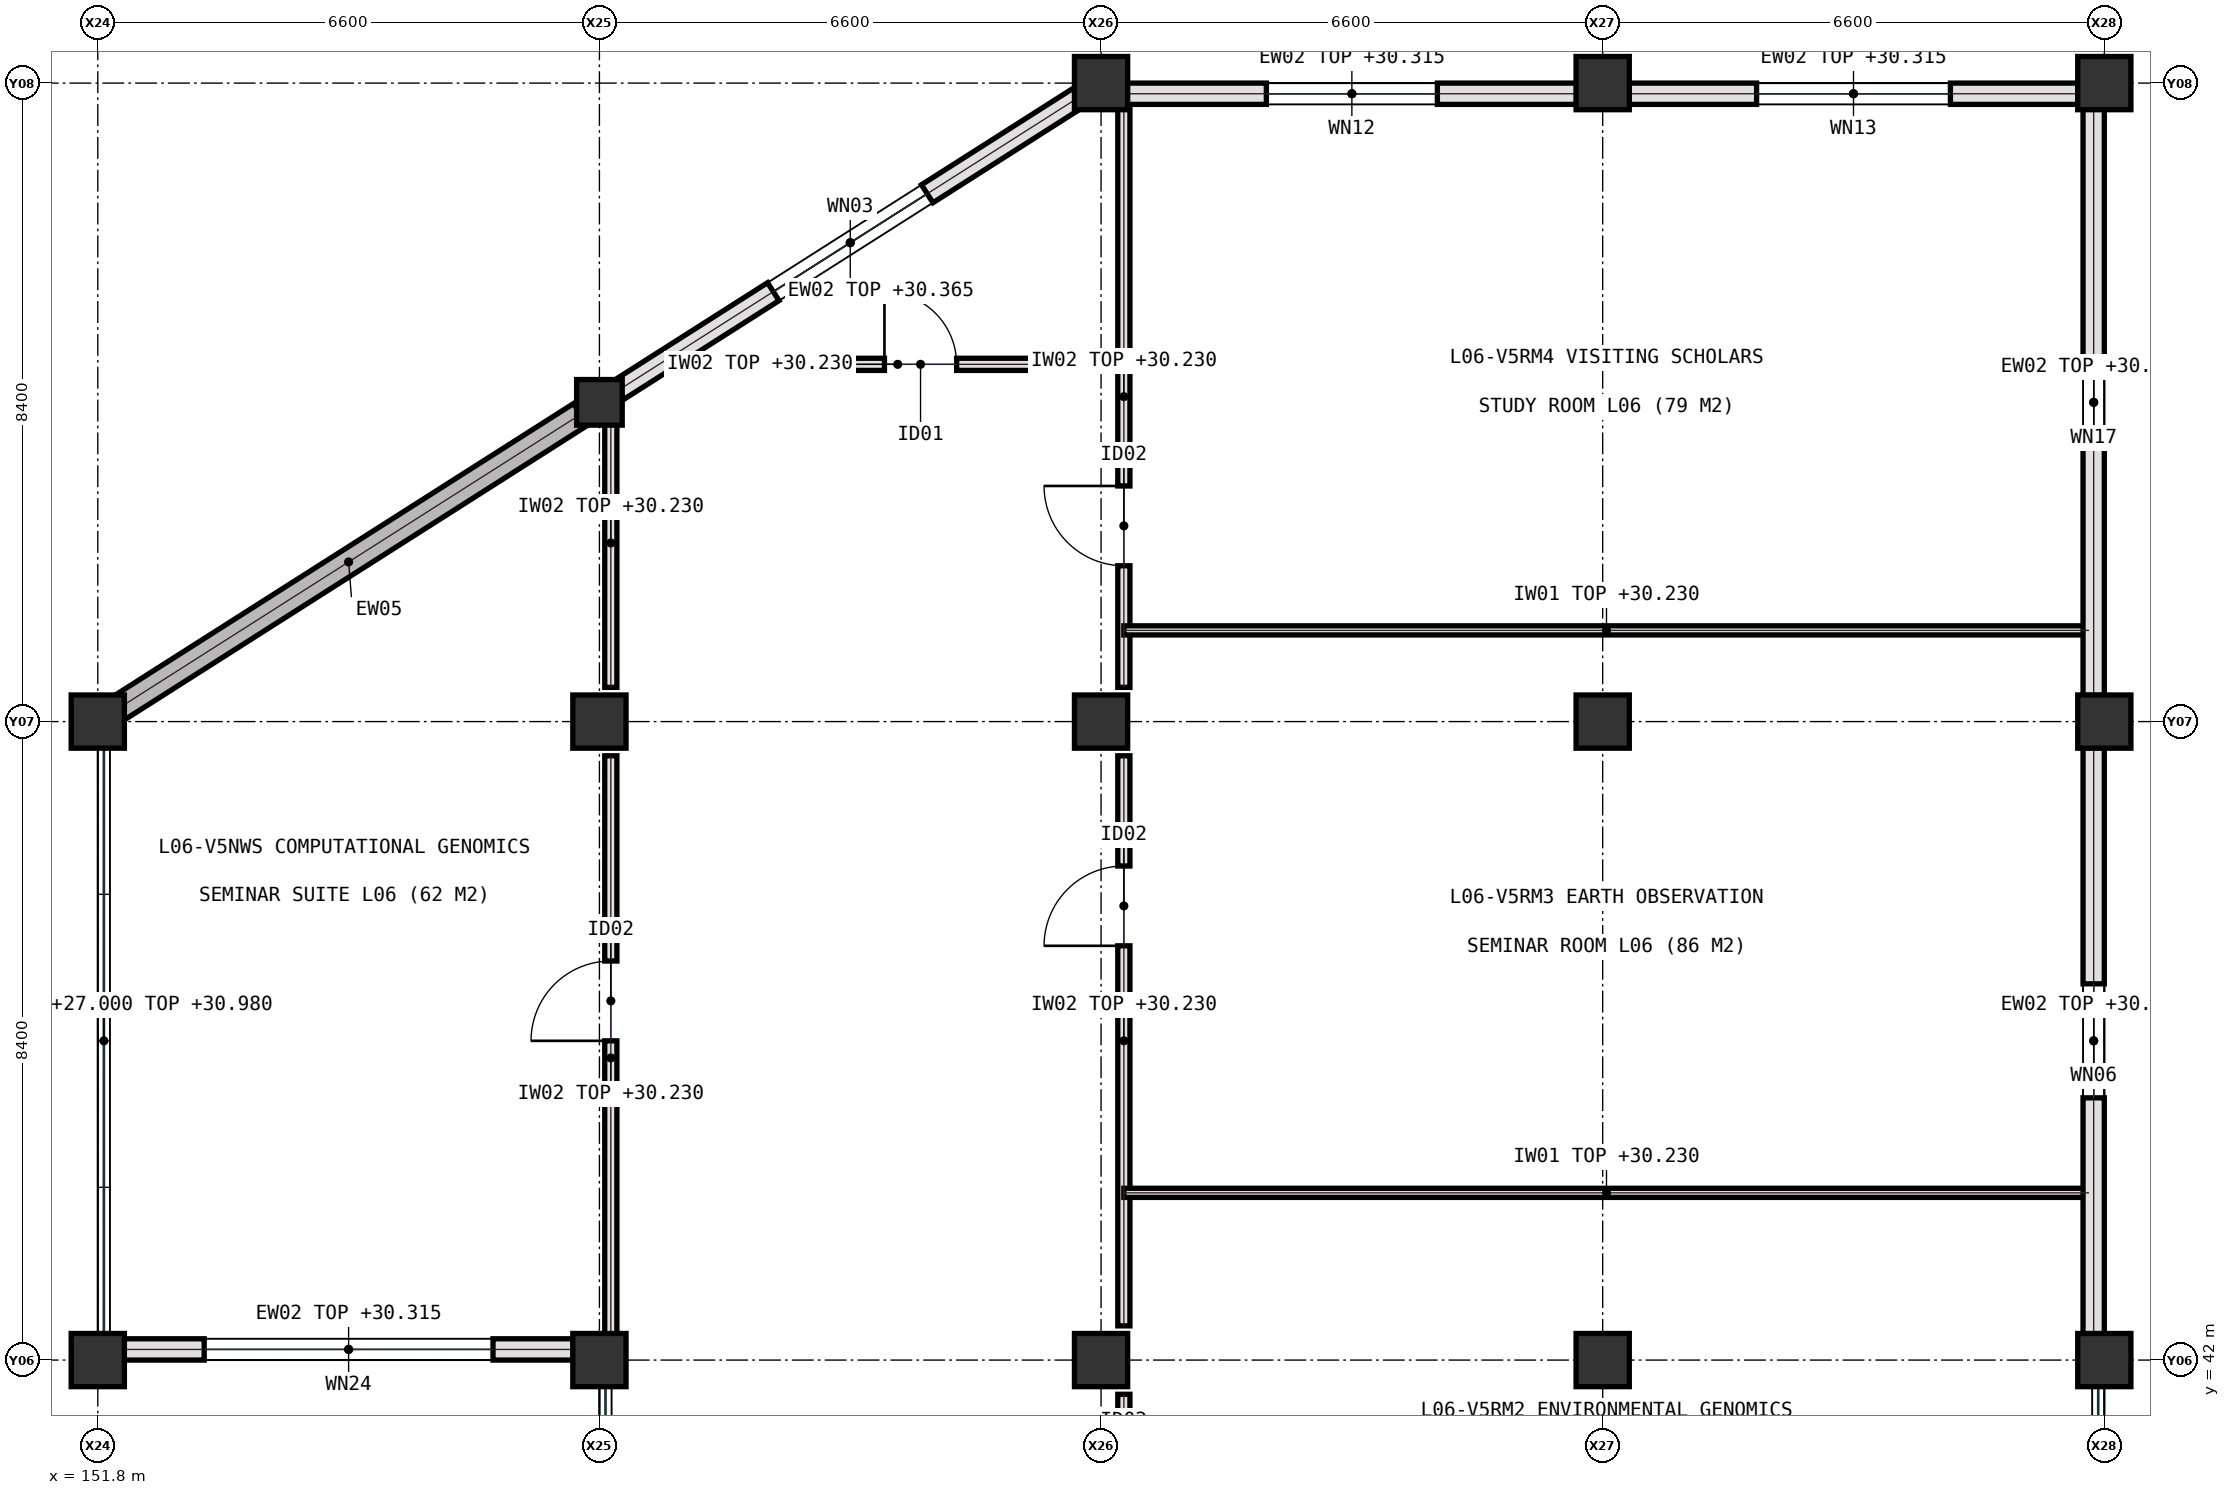
"""IFC4 building model, lengths in metres.
Left out: names, types, materials, properties, quantities, classifications, styles, units other than length and angle.
Written with IfcOpenShell. Run it as: python <this file> out.ifc"""

import sys

from ifc_helpers import new_model, si_unit, direction, frame, frame_2d, origin, origin_2d, place, context, subcontext, project, spatial, rectangle, extrude, element, fill, save


model = new_model("IFC4")
c1 = context("Model", 3, precision=1e-05, world=origin(), true_north=direction((0.0, 1.0)))
c2 = subcontext(c1, "Body", "Model", "MODEL_VIEW")
j1 = project(units=[si_unit("LENGTHUNIT", "METRE"), si_unit("PLANEANGLEUNIT", "RADIAN")], contexts=[c1])
p1 = place(None, origin())
s1 = spatial("IfcSite", under=j1, at=p1, CompositionType="ELEMENT")
p2 = place(p1, origin())
s2 = spatial("IfcBuilding", under=s1, at=p2, CompositionType="ELEMENT")
p3 = place(p2, frame((0.0, 0.0, 27.0)))
s3 = spatial("IfcBuildingStorey", under=s2, at=p3, CompositionType="ELEMENT", Elevation=27.0)
for number, where, z_axis, x_axis in (
    (1, (151.8, 42.0, 0.0), (0.0, 0.0, 1.0), (1.0, 0.0, 0.0)),
    (2, (151.8, 50.4, 0.0), (0.0, 0.0, 1.0), (1.0, 0.0, 0.0)),
    (3, (158.4, 42.0, 0.0), (0.0, 0.0, 1.0), (1.0, 0.0, 0.0)),
    (4, (158.4, 50.4, 0.0), (0.0, 0.0, 1.0), (1.0, 0.0, 0.0)),
    (5, (165.0, 42.0, 0.0), (0.0, 0.0, 1.0), (1.0, 0.0, 0.0)),
    (6, (165.0, 50.4, 0.0), (0.0, 0.0, 1.0), (1.0, 0.0, 0.0)),
    (7, (165.0, 58.8, 0.0), (0.0, 0.0, 1.0), (1.0, 0.0, 0.0)),
    (8, (171.6, 42.0, 0.0), (0.0, 0.0, 1.0), (1.0, 0.0, 0.0)),
    (9, (171.6, 50.4, 0.0), (0.0, 0.0, 1.0), (1.0, 0.0, 0.0)),
    (10, (171.6, 58.8, 0.0), (0.0, 0.0, 1.0), (1.0, 0.0, 0.0)),
    (11, (178.2, 42.0, 0.0), (0.0, 0.0, 1.0), (1.0, 0.0, 0.0)),
    (12, (178.2, 50.4, 0.0), (0.0, 0.0, 1.0), (1.0, 0.0, 0.0)),
    (13, (178.2, 58.8, 0.0), (0.0, 0.0, 1.0), (1.0, 0.0, 0.0)),
):
    element("IfcColumn", number, at=place(p3, frame(where, z_axis=z_axis, x_axis=x_axis)), inside=s3, PredefinedType="COLUMN", context=c2, shape_type="SweptSolid", body=[
        extrude(rectangle(XDim=0.7, YDim=0.7, at=origin_2d()), origin(), (0.0, 0.0, 1.0), 4.2),
    ])
p4 = place(p3, frame((158.4, 54.6, 0.0), z_axis=(0.0, 0.0, 1.0), x_axis=(1.0, 0.0, 0.0)))
e14 = element("IfcColumn", 14, at=p4, inside=s3, PredefinedType="COLUMN", context=c2, shape_type="SweptSolid", body=[
    extrude(rectangle(XDim=0.6, YDim=0.6, at=origin_2d()), origin(), (0.0, 0.0, 1.0), 3.98),
])
p5 = place(p3, frame((165.3, 33.65, 0.0), z_axis=(0.0, 0.0, 1.0), x_axis=(0.0, 1.0, 0.0)))
e15 = element("IfcWall", 15, at=p5, inside=s3, PredefinedType="PARTITIONING", context=c2, shape_type="SweptSolid", body=[
    extrude(rectangle(XDim=7.9, YDim=0.16, at=frame_2d((3.95, 0.0))), origin(), (0.0, 0.0, 1.0), 3.23),
])
p6 = place(p5, frame((1.9, 0.0, 0.0)))
e16 = element("IfcOpeningElement", 16, at=p6, cuts=e15, PredefinedType="OPENING", context=c2, shape_type="SweptSolid", body=[
    extrude(rectangle(XDim=1.05, YDim=2.15, at=frame_2d((0.525, 1.075))), frame((0.0, 0.09, 0.0), z_axis=(0.0, -1.0, 0.0), x_axis=(1.0, 0.0, 0.0)), (0.0, 0.0, 1.0), 0.18),
])
p7 = place(p5, frame((6.1, 0.0, 0.0)))
e17 = element("IfcOpeningElement", 17, at=p7, cuts=e15, PredefinedType="OPENING", context=c2, shape_type="SweptSolid", body=[
    extrude(rectangle(XDim=1.05, YDim=2.15, at=frame_2d((0.525, 1.075))), frame((0.0, 0.09, 0.0), z_axis=(0.0, -1.0, 0.0), x_axis=(1.0, 0.0, 0.0)), (0.0, 0.0, 1.0), 0.18),
])
p8 = place(p3, frame((165.3, 42.45, 0.0), z_axis=(0.0, 0.0, 1.0), x_axis=(0.0, 1.0, 0.0)))
e18 = element("IfcWall", 18, at=p8, inside=s3, PredefinedType="PARTITIONING", context=c2, shape_type="SweptSolid", body=[
    extrude(rectangle(XDim=7.5, YDim=0.16, at=frame_2d((3.75, 0.0))), origin(), (0.0, 0.0, 1.0), 3.23),
])
p9 = place(p8, frame((5.0, 0.0, 0.0)))
e19 = element("IfcOpeningElement", 19, at=p9, cuts=e18, PredefinedType="OPENING", context=c2, shape_type="SweptSolid", body=[
    extrude(rectangle(XDim=1.05, YDim=2.15, at=frame_2d((0.525, 1.075))), frame((0.0, 0.09, 0.0), z_axis=(0.0, -1.0, 0.0), x_axis=(1.0, 0.0, 0.0)), (0.0, 0.0, 1.0), 0.18),
])
p10 = place(p3, frame((165.3, 50.85, 0.0), z_axis=(0.0, 0.0, 1.0), x_axis=(0.0, 1.0, 0.0)))
e20 = element("IfcWall", 20, at=p10, inside=s3, PredefinedType="PARTITIONING", context=c2, shape_type="SweptSolid", body=[
    extrude(rectangle(XDim=7.65, YDim=0.16, at=frame_2d((3.825, 0.0))), origin(), (0.0, 0.0, 1.0), 3.23),
])
p11 = place(p10, frame((1.6, 0.0, 0.0)))
e21 = element("IfcOpeningElement", 21, at=p11, cuts=e20, PredefinedType="OPENING", context=c2, shape_type="SweptSolid", body=[
    extrude(rectangle(XDim=1.05, YDim=2.15, at=frame_2d((0.525, 1.075))), frame((0.0, 0.09, 0.0), z_axis=(0.0, -1.0, 0.0), x_axis=(1.0, 0.0, 0.0)), (0.0, 0.0, 1.0), 0.18),
])
for number, where, z_axis, x_axis in (
    (22, (165.3, 44.2, 0.0), (0.0, 0.0, 1.0), (1.0, 0.0, 0.0)),
    (23, (165.3, 51.6, 0.0), (0.0, 0.0, 1.0), (1.0, 0.0, 0.0)),
):
    element("IfcWall", number, at=place(p3, frame(where, z_axis=z_axis, x_axis=x_axis)), inside=s3, PredefinedType="PARTITIONING", context=c2, shape_type="SweptSolid", body=[
        extrude(rectangle(XDim=12.7, YDim=0.12, at=frame_2d((6.35, 0.0))), origin(), (0.0, 0.0, 1.0), 3.23),
    ])
p12 = place(p3, frame((158.55, 42.0, 0.0), z_axis=(0.0, 0.0, 1.0), x_axis=(0.0, 1.0, 0.0)))
e24 = element("IfcWall", 24, at=p12, inside=s3, PredefinedType="PARTITIONING", context=c2, shape_type="SweptSolid", body=[
    extrude(rectangle(XDim=7.95, YDim=0.16, at=frame_2d((3.975, 0.0))), origin(), (0.0, 0.0, 1.0), 3.23),
])
p13 = place(p12, frame((4.2, 0.0, 0.0)))
e25 = element("IfcOpeningElement", 25, at=p13, cuts=e24, PredefinedType="OPENING", context=c2, shape_type="SweptSolid", body=[
    extrude(rectangle(XDim=1.05, YDim=2.15, at=frame_2d((0.525, 1.075))), frame((0.0, 0.09, 0.0), z_axis=(0.0, -1.0, 0.0), x_axis=(1.0, 0.0, 0.0)), (0.0, 0.0, 1.0), 0.18),
])
p14 = place(p3, frame((158.55, 50.85, 0.0), z_axis=(0.0, 0.0, 1.0), x_axis=(0.0, 1.0, 0.0)))
e26 = element("IfcWall", 26, at=p14, inside=s3, PredefinedType="PARTITIONING", context=c2, shape_type="SweptSolid", body=[
    extrude(rectangle(XDim=3.8, YDim=0.16, at=frame_2d((1.9, 0.0))), origin(), (0.0, 0.0, 1.0), 3.23),
])
p15 = place(p3, frame((159.35, 55.1, 0.0), z_axis=(0.0, 0.0, 1.0), x_axis=(1.0, 0.0, 0.0)))
e27 = element("IfcWall", 27, at=p15, inside=s3, PredefinedType="PARTITIONING", context=c2, shape_type="SweptSolid", body=[
    extrude(rectangle(XDim=5.95, YDim=0.16, at=frame_2d((2.975, 0.0))), origin(), (0.0, 0.0, 1.0), 3.23),
])
p16 = place(p15, frame((2.8, 0.0, 0.0)))
e28 = element("IfcOpeningElement", 28, at=p16, cuts=e27, PredefinedType="OPENING", context=c2, shape_type="SweptSolid", body=[
    extrude(rectangle(XDim=0.95, YDim=2.15, at=frame_2d((0.475, 1.075))), frame((0.0, 0.09, 0.0), z_axis=(0.0, -1.0, 0.0), x_axis=(1.0, 0.0, 0.0)), (0.0, 0.0, 1.0), 0.18),
])
p17 = place(p3, frame((152.145, 42.14, 0.0), z_axis=(0.0, 0.0, 1.0), x_axis=(1.0, 0.0, 0.0)))
e29 = element("IfcWall", 29, at=p17, inside=s3, PredefinedType="SOLIDWALL", context=c2, shape_type="SweptSolid", body=[
    extrude(rectangle(XDim=5.91, YDim=0.28, at=frame_2d((2.955, 0.0))), origin(), (0.0, 0.0, 1.0), 3.315),
])
p18 = place(p17, frame((1.055, 0.0, 1.35)))
e30 = element("IfcOpeningElement", 30, at=p18, cuts=e29, PredefinedType="OPENING", context=c2, shape_type="SweptSolid", body=[
    extrude(rectangle(XDim=3.8, YDim=1.15, at=frame_2d((1.9, 0.575))), frame((0.0, 0.15, 0.0), z_axis=(0.0, -1.0, 0.0), x_axis=(1.0, 0.0, 0.0)), (0.0, 0.0, 1.0), 0.3),
])
p19 = place(p3, frame((171.255, 58.66, 0.0), z_axis=(0.0, 0.0, 1.0), x_axis=(-1.0, 0.0, 0.0)))
e31 = element("IfcWall", 31, at=p19, inside=s3, PredefinedType="SOLIDWALL", context=c2, shape_type="SweptSolid", body=[
    extrude(rectangle(XDim=5.91, YDim=0.28, at=frame_2d((2.955, 0.0))), origin(), (0.0, 0.0, 1.0), 3.315),
])
p20 = place(p19, frame((1.83, 0.0, 0.95)))
e32 = element("IfcOpeningElement", 32, at=p20, cuts=e31, PredefinedType="OPENING", context=c2, shape_type="SweptSolid", body=[
    extrude(rectangle(XDim=2.25, YDim=1.55, at=frame_2d((1.125, 0.775))), frame((0.0, 0.15, 0.0), z_axis=(0.0, -1.0, 0.0), x_axis=(1.0, 0.0, 0.0)), (0.0, 0.0, 1.0), 0.3),
])
p21 = place(p3, frame((178.06, 42.345, 0.0), z_axis=(0.0, 0.0, 1.0), x_axis=(0.0, 1.0, 0.0)))
e33 = element("IfcWall", 33, at=p21, inside=s3, PredefinedType="SOLIDWALL", context=c2, shape_type="SweptSolid", body=[
    extrude(rectangle(XDim=7.71, YDim=0.28, at=frame_2d((3.855, 0.0))), origin(), (0.0, 0.0, 1.0), 3.365),
])
p22 = place(p21, frame((3.105, 0.0, 0.95)))
e34 = element("IfcOpeningElement", 34, at=p22, cuts=e33, PredefinedType="OPENING", context=c2, shape_type="SweptSolid", body=[
    extrude(rectangle(XDim=1.5, YDim=2.1, at=frame_2d((0.75, 1.05))), frame((0.0, 0.15, 0.0), z_axis=(0.0, -1.0, 0.0), x_axis=(1.0, 0.0, 0.0)), (0.0, 0.0, 1.0), 0.3),
])
p23 = place(p3, frame((178.06, 50.745, 0.0), z_axis=(0.0, 0.0, 1.0), x_axis=(0.0, 1.0, 0.0)))
e35 = element("IfcWall", 35, at=p23, inside=s3, PredefinedType="SOLIDWALL", context=c2, shape_type="SweptSolid", body=[
    extrude(rectangle(XDim=7.71, YDim=0.28, at=frame_2d((3.855, 0.0))), origin(), (0.0, 0.0, 1.0), 3.365),
])
p24 = place(p23, frame((3.33, 0.0, 0.95)))
e36 = element("IfcOpeningElement", 36, at=p24, cuts=e35, PredefinedType="OPENING", context=c2, shape_type="SweptSolid", body=[
    extrude(rectangle(XDim=1.05, YDim=1.75, at=frame_2d((0.525, 0.875))), frame((0.0, 0.15, 0.0), z_axis=(0.0, -1.0, 0.0), x_axis=(1.0, 0.0, 0.0)), (0.0, 0.0, 1.0), 0.3),
])
p25 = place(p3, frame((177.855, 58.66, 0.0), z_axis=(0.0, 0.0, 1.0), x_axis=(-1.0, 0.0, 0.0)))
e37 = element("IfcWall", 37, at=p25, inside=s3, PredefinedType="SOLIDWALL", context=c2, shape_type="SweptSolid", body=[
    extrude(rectangle(XDim=5.91, YDim=0.28, at=frame_2d((2.955, 0.0))), origin(), (0.0, 0.0, 1.0), 3.315),
])
p26 = place(p25, frame((1.68, 0.0, 0.95)))
e38 = element("IfcOpeningElement", 38, at=p26, cuts=e37, PredefinedType="OPENING", context=c2, shape_type="SweptSolid", body=[
    extrude(rectangle(XDim=2.55, YDim=1.65, at=frame_2d((1.275, 0.825))), frame((0.0, 0.15, 0.0), z_axis=(0.0, -1.0, 0.0), x_axis=(1.0, 0.0, 0.0)), (0.0, 0.0, 1.0), 0.3),
])
p27 = place(p3, frame((152.05, 50.56, 0.0), z_axis=(0.0, 0.0, 1.0), x_axis=(0.843776886751, 0.536694107835, 0.0)))
e39 = element("IfcWall", 39, at=p27, inside=s3, PredefinedType="SHEAR", context=c2, shape_type="SweptSolid", body=[
    extrude(rectangle(XDim=7.229, YDim=0.34, at=frame_2d((3.615, 0.0))), origin(), (0.0, 0.0, 1.0), 3.98),
])
p28 = place(p3, frame((158.65, 54.76, 0.0), z_axis=(0.0, 0.0, 1.0), x_axis=(0.843786613851, 0.536678814829, 0.0)))
e40 = element("IfcWall", 40, at=p28, inside=s3, PredefinedType="SOLIDWALL", context=c2, shape_type="SweptSolid", body=[
    extrude(rectangle(XDim=7.229, YDim=0.28, at=frame_2d((3.615, 0.0))), origin(), (0.0, 0.0, 1.0), 3.365),
])
p29 = place(p28, frame((2.415, 0.0, 0.95)))
e41 = element("IfcOpeningElement", 41, at=p29, cuts=e40, PredefinedType="OPENING", context=c2, shape_type="SweptSolid", body=[
    extrude(rectangle(XDim=2.4, YDim=1.6, at=frame_2d((1.2, 0.8))), frame((0.0, 0.15, 0.0), z_axis=(0.0, -1.0, 0.0), x_axis=(1.0, 0.0, 0.0)), (0.0, 0.0, 1.0), 0.3),
])
p30 = place(p9, origin())
e42 = element("IfcDoor", 42, at=p30, inside=s3, OperationType="SINGLE_SWING_LEFT", PredefinedType="DOOR", context=c2, shape_type="SweptSolid", body=[
    extrude(rectangle(XDim=1.05, YDim=2.15, at=frame_2d((0.525, 1.075))), frame((0.0, 0.025, 0.0), z_axis=(0.0, -1.0, 0.0), x_axis=(1.0, 0.0, 0.0)), (0.0, 0.0, 1.0), 0.05),
])
fill(e19, e42)
p31 = place(p11, origin())
e43 = element("IfcDoor", 43, at=p31, inside=s3, OperationType="SINGLE_SWING_RIGHT", PredefinedType="DOOR", context=c2, shape_type="SweptSolid", body=[
    extrude(rectangle(XDim=1.05, YDim=2.15, at=frame_2d((0.525, 1.075))), frame((0.0, 0.025, 0.0), z_axis=(0.0, -1.0, 0.0), x_axis=(1.0, 0.0, 0.0)), (0.0, 0.0, 1.0), 0.05),
])
fill(e21, e43)
p32 = place(p13, origin())
e44 = element("IfcDoor", 44, at=p32, inside=s3, OperationType="SINGLE_SWING_LEFT", PredefinedType="DOOR", context=c2, shape_type="SweptSolid", body=[
    extrude(rectangle(XDim=1.05, YDim=2.15, at=frame_2d((0.525, 1.075))), frame((0.0, 0.025, 0.0), z_axis=(0.0, -1.0, 0.0), x_axis=(1.0, 0.0, 0.0)), (0.0, 0.0, 1.0), 0.05),
])
fill(e25, e44)
p33 = place(p16, origin())
e45 = element("IfcDoor", 45, at=p33, inside=s3, OperationType="SINGLE_SWING_LEFT", PredefinedType="DOOR", context=c2, shape_type="SweptSolid", body=[
    extrude(rectangle(XDim=0.95, YDim=2.15, at=frame_2d((0.475, 1.075))), frame((0.0, 0.025, 0.0), z_axis=(0.0, -1.0, 0.0), x_axis=(1.0, 0.0, 0.0)), (0.0, 0.0, 1.0), 0.05),
])
fill(e28, e45)
p34 = place(p18, origin())
e46 = element("IfcWindow", 46, at=p34, inside=s3, PartitioningType="SINGLE_PANEL", PredefinedType="WINDOW", context=c2, shape_type="SweptSolid", body=[
    extrude(rectangle(XDim=3.8, YDim=1.15, at=frame_2d((1.9, 0.575))), frame((0.0, 0.03, 0.0), z_axis=(0.0, -1.0, 0.0), x_axis=(1.0, 0.0, 0.0)), (0.0, 0.0, 1.0), 0.06),
])
fill(e30, e46)
p35 = place(p20, origin())
e47 = element("IfcWindow", 47, at=p35, inside=s3, PartitioningType="SINGLE_PANEL", PredefinedType="WINDOW", context=c2, shape_type="SweptSolid", body=[
    extrude(rectangle(XDim=2.25, YDim=1.55, at=frame_2d((1.125, 0.775))), frame((0.0, 0.03, 0.0), z_axis=(0.0, -1.0, 0.0), x_axis=(1.0, 0.0, 0.0)), (0.0, 0.0, 1.0), 0.06),
])
fill(e32, e47)
p36 = place(p22, origin())
e48 = element("IfcWindow", 48, at=p36, inside=s3, PartitioningType="SINGLE_PANEL", PredefinedType="WINDOW", context=c2, shape_type="SweptSolid", body=[
    extrude(rectangle(XDim=1.5, YDim=2.1, at=frame_2d((0.75, 1.05))), frame((0.0, 0.03, 0.0), z_axis=(0.0, -1.0, 0.0), x_axis=(1.0, 0.0, 0.0)), (0.0, 0.0, 1.0), 0.06),
])
fill(e34, e48)
p37 = place(p24, origin())
e49 = element("IfcWindow", 49, at=p37, inside=s3, PartitioningType="SINGLE_PANEL", PredefinedType="WINDOW", context=c2, shape_type="SweptSolid", body=[
    extrude(rectangle(XDim=1.05, YDim=1.75, at=frame_2d((0.525, 0.875))), frame((0.0, 0.03, 0.0), z_axis=(0.0, -1.0, 0.0), x_axis=(1.0, 0.0, 0.0)), (0.0, 0.0, 1.0), 0.06),
])
fill(e36, e49)
p38 = place(p26, origin())
e50 = element("IfcWindow", 50, at=p38, inside=s3, PartitioningType="SINGLE_PANEL", PredefinedType="WINDOW", context=c2, shape_type="SweptSolid", body=[
    extrude(rectangle(XDim=2.55, YDim=1.65, at=frame_2d((1.275, 0.825))), frame((0.0, 0.03, 0.0), z_axis=(0.0, -1.0, 0.0), x_axis=(1.0, 0.0, 0.0)), (0.0, 0.0, 1.0), 0.06),
])
fill(e38, e50)
p39 = place(p29, origin())
e51 = element("IfcWindow", 51, at=p39, inside=s3, PartitioningType="SINGLE_PANEL", PredefinedType="WINDOW", context=c2, shape_type="SweptSolid", body=[
    extrude(rectangle(XDim=2.4, YDim=1.6, at=frame_2d((1.2, 0.8))), frame((0.0, 0.03, 0.0), z_axis=(0.0, -1.0, 0.0), x_axis=(1.0, 0.0, 0.0)), (0.0, 0.0, 1.0), 0.06),
])
fill(e41, e51)
save(model, sys.argv[1])
